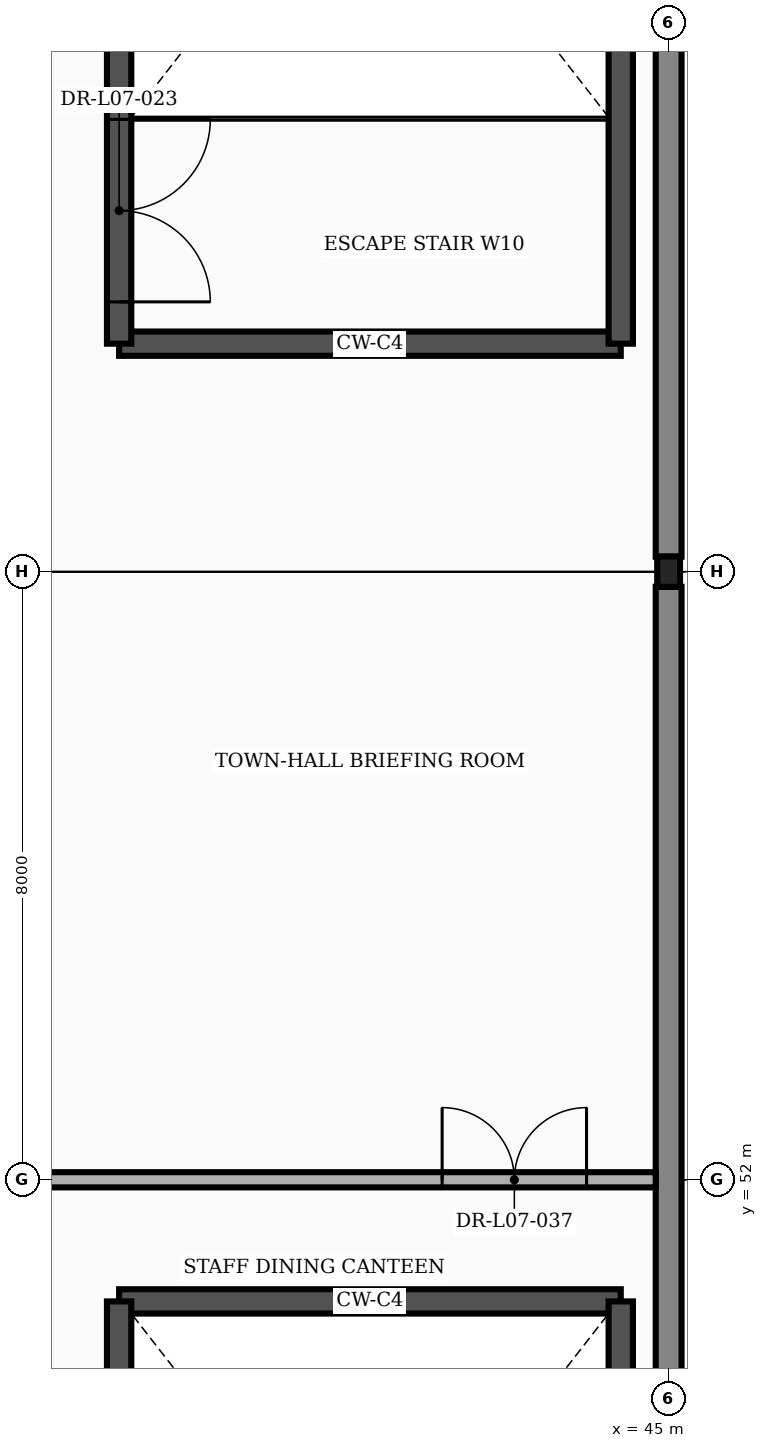
"""IFC4 building model, lengths in metres.
Left out: names, types, materials, properties, quantities, classifications, styles, units other than length and angle.
Written with IfcOpenShell. Run it as: python <this file> out.ifc"""

import sys

from ifc_helpers import new_model, si_unit, direction, frame, frame_2d, origin, origin_2d, place, context, subcontext, project, spatial, rectangle, i_section, extrude, element, fill, save


model = new_model("IFC4")
c1 = context("Model", 3, precision=1e-05, world=origin(), true_north=direction((0.0, 1.0)))
c2 = subcontext(c1, "Body", "Model", "MODEL_VIEW")
j1 = project(units=[si_unit("LENGTHUNIT", "METRE"), si_unit("PLANEANGLEUNIT", "RADIAN")], contexts=[c1])
p1 = place(None, origin())
s1 = spatial("IfcSite", under=j1, at=p1, CompositionType="ELEMENT")
p2 = place(p1, origin())
s2 = spatial("IfcBuilding", under=s1, at=p2, CompositionType="ELEMENT")
p3 = place(p2, frame((0.0, 0.0, 33.3)))
s3 = spatial("IfcBuildingStorey", under=s2, at=p3, CompositionType="ELEMENT", Elevation=33.3)
p4 = place(p3, frame((45.0, 60.0, 0.0), z_axis=(0.0, 0.0, 1.0), x_axis=(1.0, 0.0, 0.0)))
e1 = element("IfcColumn", 1, at=p4, inside=s3, PredefinedType="COLUMN", context=c2, shape_type="SweptSolid", body=[
    extrude(i_section(OverallWidth=0.3, OverallDepth=0.4, WebThickness=0.013, FlangeThickness=0.024, FilletRadius=0.027, at=origin_2d()), origin(), (0.0, 0.0, 1.0), 4.5),
])
for number, where, z_axis, x_axis in (
    (2, (45.0, 36.198, 0.0), (0.0, 0.0, 1.0), (0.0, 1.0, 0.0)),
    (3, (45.0, 60.198, 0.0), (0.0, 0.0, 1.0), (0.0, 1.0, 0.0)),
):
    element("IfcWall", number, at=place(p3, frame(where, z_axis=z_axis, x_axis=x_axis)), inside=s3, PredefinedType="STANDARD", context=c2, shape_type="SweptSolid", body=[
        extrude(rectangle(XDim=23.604, YDim=0.34, at=frame_2d((11.802, 0.0))), origin(), (0.0, 0.0, 1.0), 3.563),
    ])
p5 = place(p3, frame((37.77, 50.4, 0.0), z_axis=(0.0, 0.0, 1.0), x_axis=(1.0, 0.0, 0.0)))
e4 = element("IfcWall", 4, at=p5, inside=s3, PredefinedType="SHEAR", context=c2, shape_type="SweptSolid", body=[
    extrude(rectangle(XDim=6.6, YDim=0.32, at=frame_2d((3.3, 0.0))), origin(), (0.0, 0.0, 1.0), 4.255),
])
p6 = place(p3, frame((37.77, 39.2, 0.0), z_axis=(0.0, 0.0, 1.0), x_axis=(0.0, 1.0, 0.0)))
e5 = element("IfcWall", 5, at=p6, inside=s3, PredefinedType="SHEAR", context=c2, shape_type="SweptSolid", body=[
    extrude(rectangle(XDim=11.2, YDim=0.32, at=frame_2d((5.6, 0.0))), origin(), (0.0, 0.0, 1.0), 4.255),
])
p7 = place(p6, frame((0.55, 0.0, 0.0)))
e6 = element("IfcOpeningElement", 6, at=p7, cuts=e5, PredefinedType="OPENING", context=c2, shape_type="SweptSolid", body=[
    extrude(rectangle(XDim=2.4, YDim=2.25, at=frame_2d((1.2, 1.125))), frame((0.0, 0.172, 0.0), z_axis=(0.0, -1.0, 0.0), x_axis=(1.0, 0.0, 0.0)), (0.0, 0.0, 1.0), 0.344),
])
p8 = place(p3, frame((44.37, 39.2, 0.0), z_axis=(0.0, 0.0, 1.0), x_axis=(0.0, 1.0, 0.0)))
e7 = element("IfcWall", 7, at=p8, inside=s3, PredefinedType="SHEAR", context=c2, shape_type="SweptSolid", body=[
    extrude(rectangle(XDim=11.2, YDim=0.32, at=frame_2d((5.6, 0.0))), origin(), (0.0, 0.0, 1.0), 4.255),
])
p9 = place(p3, frame((37.77, 63.0, 0.0), z_axis=(0.0, 0.0, 1.0), x_axis=(1.0, 0.0, 0.0)))
e8 = element("IfcWall", 8, at=p9, inside=s3, PredefinedType="SHEAR", context=c2, shape_type="SweptSolid", body=[
    extrude(rectangle(XDim=6.6, YDim=0.32, at=frame_2d((3.3, 0.0))), origin(), (0.0, 0.0, 1.0), 4.255),
])
p10 = place(p3, frame((37.77, 63.0, 0.0), z_axis=(0.0, 0.0, 1.0), x_axis=(0.0, 1.0, 0.0)))
e9 = element("IfcWall", 9, at=p10, inside=s3, PredefinedType="SHEAR", context=c2, shape_type="SweptSolid", body=[
    extrude(rectangle(XDim=11.2, YDim=0.32, at=frame_2d((5.6, 0.0))), origin(), (0.0, 0.0, 1.0), 4.255),
])
p11 = place(p10, frame((0.55, 0.0, 0.0)))
e10 = element("IfcOpeningElement", 10, at=p11, cuts=e9, PredefinedType="OPENING", context=c2, shape_type="SweptSolid", body=[
    extrude(rectangle(XDim=2.4, YDim=2.25, at=frame_2d((1.2, 1.125))), frame((0.0, 0.172, 0.0), z_axis=(0.0, -1.0, 0.0), x_axis=(1.0, 0.0, 0.0)), (0.0, 0.0, 1.0), 0.344),
])
p12 = place(p3, frame((44.37, 63.0, 0.0), z_axis=(0.0, 0.0, 1.0), x_axis=(0.0, 1.0, 0.0)))
e11 = element("IfcWall", 11, at=p12, inside=s3, PredefinedType="SHEAR", context=c2, shape_type="SweptSolid", body=[
    extrude(rectangle(XDim=11.2, YDim=0.32, at=frame_2d((5.6, 0.0))), origin(), (0.0, 0.0, 1.0), 4.255),
])
p13 = place(p3, frame((26.56, 52.0, 0.0), z_axis=(0.0, 0.0, 1.0), x_axis=(1.0, 0.0, 0.0)))
e12 = element("IfcWall", 12, at=p13, inside=s3, PredefinedType="PARTITIONING", context=c2, shape_type="SweptSolid", body=[
    extrude(rectangle(XDim=18.27, YDim=0.2, at=frame_2d((9.135, 0.0))), origin(), (0.0, 0.0, 1.0), 3.868),
])
p14 = place(p13, frame((15.46, 0.0, 0.0)))
e13 = element("IfcOpeningElement", 13, at=p14, cuts=e12, PredefinedType="OPENING", context=c2, shape_type="SweptSolid", body=[
    extrude(rectangle(XDim=1.9, YDim=2.35, at=frame_2d((0.95, 1.175))), frame((0.0, 0.112, 0.0), z_axis=(0.0, -1.0, 0.0), x_axis=(1.0, 0.0, 0.0)), (0.0, 0.0, 1.0), 0.224),
])
p15 = place(p11, frame((2.4, 0.0, 0.0), z_axis=(0.0, 0.0, 1.0), x_axis=(-1.0, 0.0, 0.0)))
e14 = element("IfcDoor", 14, at=p15, inside=s3, OperationType="DOUBLE_DOOR_SINGLE_SWING", PredefinedType="DOOR", context=c2, shape_type="SweptSolid", body=[
    extrude(rectangle(XDim=2.4, YDim=2.25, at=frame_2d((1.2, 1.125))), frame((0.0, 0.025, 0.0), z_axis=(0.0, -1.0, 0.0), x_axis=(1.0, 0.0, 0.0)), (0.0, 0.0, 1.0), 0.05),
])
fill(e10, e14)
p16 = place(p14, origin())
e15 = element("IfcDoor", 15, at=p16, inside=s3, OperationType="DOUBLE_DOOR_SINGLE_SWING", PredefinedType="DOOR", context=c2, shape_type="SweptSolid", body=[
    extrude(rectangle(XDim=1.9, YDim=2.35, at=frame_2d((0.95, 1.175))), frame((0.0, 0.025, 0.0), z_axis=(0.0, -1.0, 0.0), x_axis=(1.0, 0.0, 0.0)), (0.0, 0.0, 1.0), 0.05),
])
fill(e13, e15)
save(model, sys.argv[1])
